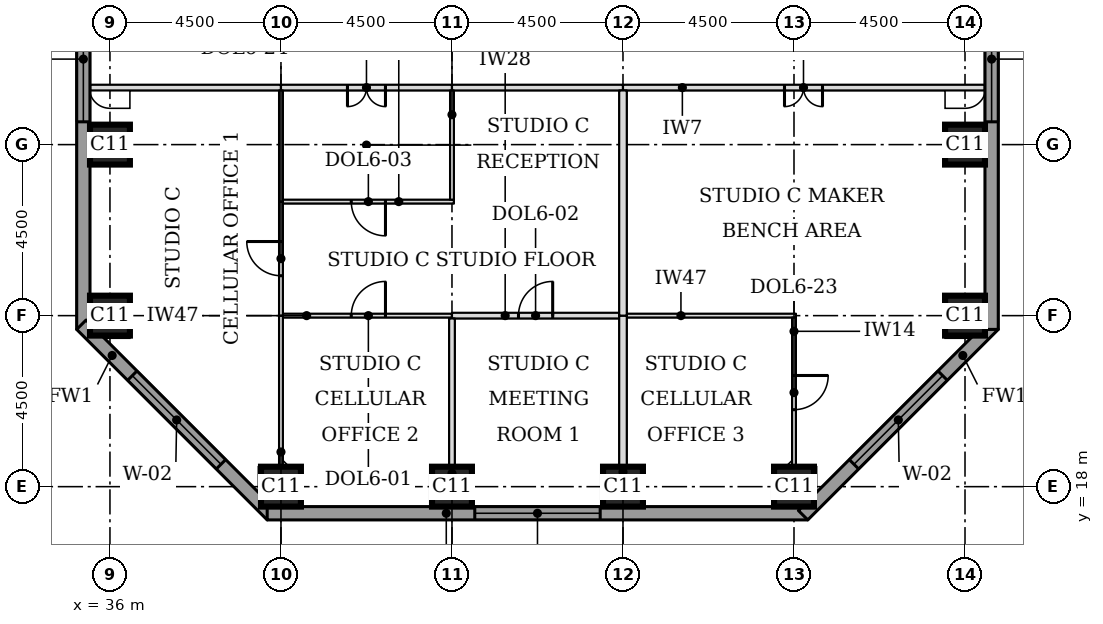
"""IFC4 building model, lengths in metres.
Left out: names, types, materials, properties, quantities, classifications, styles, units other than length and angle.
Written with IfcOpenShell. Run it as: python <this file> out.ifc"""

import sys

from ifc_helpers import new_model, si_unit, direction, frame, frame_2d, origin, origin_2d, place, context, subcontext, project, spatial, rectangle, extrude, element, fill, save


model = new_model("IFC4")
c1 = context("Model", 3, precision=1e-05, world=origin(), true_north=direction((0.0, 1.0)))
c2 = subcontext(c1, "Body", "Model", "MODEL_VIEW")
j1 = project(units=[si_unit("LENGTHUNIT", "METRE"), si_unit("PLANEANGLEUNIT", "RADIAN")], contexts=[c1])
p1 = place(None, origin())
s1 = spatial("IfcSite", under=j1, at=p1, CompositionType="ELEMENT")
p2 = place(p1, origin())
s2 = spatial("IfcBuilding", under=s1, at=p2, CompositionType="ELEMENT")
p3 = place(p2, frame((0.0, 0.0, 119.6)))
s3 = spatial("IfcBuildingStorey", under=s2, at=p3, CompositionType="ELEMENT", Elevation=119.6)
for number, where, z_axis, x_axis in (
    (1, (40.5, 18.0, 0.0), (0.0, 0.0, 1.0), (1.0, 0.0, 0.0)),
    (2, (45.0, 18.0, 0.0), (0.0, 0.0, 1.0), (1.0, 0.0, 0.0)),
    (3, (49.5, 18.0, 0.0), (0.0, 0.0, 1.0), (1.0, 0.0, 0.0)),
    (4, (54.0, 18.0, 0.0), (0.0, 0.0, 1.0), (1.0, 0.0, 0.0)),
    (5, (36.0, 22.5, 0.0), (0.0, 0.0, 1.0), (1.0, 0.0, 0.0)),
    (6, (58.5, 22.5, 0.0), (0.0, 0.0, 1.0), (1.0, 0.0, 0.0)),
    (7, (36.0, 27.0, 0.0), (0.0, 0.0, 1.0), (1.0, 0.0, 0.0)),
    (8, (58.5, 27.0, 0.0), (0.0, 0.0, 1.0), (1.0, 0.0, 0.0)),
):
    element("IfcColumn", number, at=place(p3, frame(where, z_axis=z_axis, x_axis=x_axis)), inside=s3, PredefinedType="COLUMN", context=c2, shape_type="SweptSolid", body=[
        extrude(rectangle(XDim=1.05, YDim=1.05, at=origin_2d()), origin(), (0.0, 0.0, 1.0), 3.7),
    ])
p4 = place(p3, frame((35.3, 39.975, 0.0), z_axis=(0.0, 0.0, 1.0), x_axis=(0.0, -1.0, 0.0)))
e9 = element("IfcWall", 9, at=p4, inside=s3, PredefinedType="STANDARD", context=c2, shape_type="SweptSolid", body=[
    extrude(rectangle(XDim=17.837, YDim=0.35, at=frame_2d((8.919, 0.0))), origin(), (0.0, 0.0, 1.0), 3.525),
])
p5 = place(p4, frame((0.5, 0.0, 0.9)))
e10 = element("IfcOpeningElement", 10, at=p5, cuts=e9, PredefinedType="OPENING", context=c2, shape_type="SweptSolid", body=[
    extrude(rectangle(XDim=3.3, YDim=1.9, at=frame_2d((1.65, 0.95))), frame((0.0, 0.185, 0.0), z_axis=(0.0, -1.0, 0.0), x_axis=(1.0, 0.0, 0.0)), (0.0, 0.0, 1.0), 0.37),
])
p6 = place(p4, frame((9.075, 0.0, 0.9)))
e11 = element("IfcOpeningElement", 11, at=p6, cuts=e9, PredefinedType="OPENING", context=c2, shape_type="SweptSolid", body=[
    extrude(rectangle(XDim=3.3, YDim=1.9, at=frame_2d((1.65, 0.95))), frame((0.0, 0.185, 0.0), z_axis=(0.0, -1.0, 0.0), x_axis=(1.0, 0.0, 0.0)), (0.0, 0.0, 1.0), 0.37),
])
p7 = place(p3, frame((35.249, 22.261, 0.0), z_axis=(0.0, 0.0, 1.0), x_axis=(0.707106781187, -0.707106781187, 0.0)))
e12 = element("IfcWall", 12, at=p7, inside=s3, PredefinedType="STANDARD", context=c2, shape_type="SweptSolid", body=[
    extrude(rectangle(XDim=7.089, YDim=0.35, at=frame_2d((3.544, 0.0))), origin(), (0.0, 0.0, 1.0), 3.525),
])
p8 = place(p7, frame((1.894, 0.0, 0.9)))
e13 = element("IfcOpeningElement", 13, at=p8, cuts=e12, PredefinedType="OPENING", context=c2, shape_type="SweptSolid", body=[
    extrude(rectangle(XDim=3.3, YDim=1.9, at=frame_2d((1.65, 0.95))), frame((0.0, 0.185, 0.0), z_axis=(0.0, -1.0, 0.0), x_axis=(1.0, 0.0, 0.0)), (0.0, 0.0, 1.0), 0.37),
])
p9 = place(p3, frame((40.138, 17.3, 0.0), z_axis=(0.0, 0.0, 1.0), x_axis=(1.0, 0.0, 0.0)))
e14 = element("IfcWall", 14, at=p9, inside=s3, PredefinedType="STANDARD", context=c2, shape_type="SweptSolid", body=[
    extrude(rectangle(XDim=14.225, YDim=0.35, at=frame_2d((7.112, 0.0))), origin(), (0.0, 0.0, 1.0), 3.525),
])
p10 = place(p9, frame((5.462, 0.0, 0.9)))
e15 = element("IfcOpeningElement", 15, at=p10, cuts=e14, PredefinedType="OPENING", context=c2, shape_type="SweptSolid", body=[
    extrude(rectangle(XDim=3.3, YDim=1.9, at=frame_2d((1.65, 0.95))), frame((0.0, 0.185, 0.0), z_axis=(0.0, -1.0, 0.0), x_axis=(1.0, 0.0, 0.0)), (0.0, 0.0, 1.0), 0.37),
])
p11 = place(p3, frame((54.239, 17.249, 0.0), z_axis=(0.0, 0.0, 1.0), x_axis=(0.707106781187, 0.707106781187, 0.0)))
e16 = element("IfcWall", 16, at=p11, inside=s3, PredefinedType="STANDARD", context=c2, shape_type="SweptSolid", body=[
    extrude(rectangle(XDim=7.089, YDim=0.35, at=frame_2d((3.544, 0.0))), origin(), (0.0, 0.0, 1.0), 3.525),
])
p12 = place(p11, frame((1.894, 0.0, 0.9)))
e17 = element("IfcOpeningElement", 17, at=p12, cuts=e16, PredefinedType="OPENING", context=c2, shape_type="SweptSolid", body=[
    extrude(rectangle(XDim=3.3, YDim=1.9, at=frame_2d((1.65, 0.95))), frame((0.0, 0.185, 0.0), z_axis=(0.0, -1.0, 0.0), x_axis=(1.0, 0.0, 0.0)), (0.0, 0.0, 1.0), 0.37),
])
p13 = place(p3, frame((59.2, 22.138, 0.0), z_axis=(0.0, 0.0, 1.0), x_axis=(0.0, 1.0, 0.0)))
e18 = element("IfcWall", 18, at=p13, inside=s3, PredefinedType="STANDARD", context=c2, shape_type="SweptSolid", body=[
    extrude(rectangle(XDim=17.837, YDim=0.35, at=frame_2d((8.919, 0.0))), origin(), (0.0, 0.0, 1.0), 3.525),
])
p14 = place(p13, frame((5.462, 0.0, 0.9)))
e19 = element("IfcOpeningElement", 19, at=p14, cuts=e18, PredefinedType="OPENING", context=c2, shape_type="SweptSolid", body=[
    extrude(rectangle(XDim=3.3, YDim=1.9, at=frame_2d((1.65, 0.95))), frame((0.0, 0.185, 0.0), z_axis=(0.0, -1.0, 0.0), x_axis=(1.0, 0.0, 0.0)), (0.0, 0.0, 1.0), 0.37),
])
p15 = place(p13, frame((14.037, 0.0, 0.9)))
e20 = element("IfcOpeningElement", 20, at=p15, cuts=e18, PredefinedType="OPENING", context=c2, shape_type="SweptSolid", body=[
    extrude(rectangle(XDim=3.3, YDim=1.9, at=frame_2d((1.65, 0.95))), frame((0.0, 0.185, 0.0), z_axis=(0.0, -1.0, 0.0), x_axis=(1.0, 0.0, 0.0)), (0.0, 0.0, 1.0), 0.37),
])
p16 = place(p3, frame((40.55, 22.5, 0.0), z_axis=(0.0, 0.0, 1.0), x_axis=(1.0, 0.0, 0.0)))
e21 = element("IfcWall", 21, at=p16, inside=s3, PredefinedType="PARTITIONING", context=c2, shape_type="SweptSolid", body=[
    extrude(rectangle(XDim=4.45, YDim=0.1, at=frame_2d((2.225, 0.0))), origin(), (0.0, 0.0, 1.0), 2.55),
])
p17 = place(p16, frame((1.8, 0.0, 0.0)))
e22 = element("IfcOpeningElement", 22, at=p17, cuts=e21, PredefinedType="OPENING", context=c2, shape_type="SweptSolid", body=[
    extrude(rectangle(XDim=0.9, YDim=2.1, at=frame_2d((0.45, 1.05))), frame((0.0, 0.06, 0.0), z_axis=(0.0, -1.0, 0.0), x_axis=(1.0, 0.0, 0.0)), (0.0, 0.0, 1.0), 0.12),
])
p18 = place(p3, frame((45.0, 22.5, 0.0), z_axis=(0.0, 0.0, 1.0), x_axis=(1.0, 0.0, 0.0)))
e23 = element("IfcWall", 23, at=p18, inside=s3, PredefinedType="PARTITIONING", context=c2, shape_type="SweptSolid", body=[
    extrude(rectangle(XDim=4.4, YDim=0.15, at=frame_2d((2.2, 0.0))), origin(), (0.0, 0.0, 1.0), 2.55),
])
p19 = place(p18, frame((1.75, 0.0, 0.0)))
e24 = element("IfcOpeningElement", 24, at=p19, cuts=e23, PredefinedType="OPENING", context=c2, shape_type="SweptSolid", body=[
    extrude(rectangle(XDim=0.9, YDim=2.1, at=frame_2d((0.45, 1.05))), frame((0.0, 0.085, 0.0), z_axis=(0.0, -1.0, 0.0), x_axis=(1.0, 0.0, 0.0)), (0.0, 0.0, 1.0), 0.17),
])
p20 = place(p3, frame((49.6, 22.5, 0.0), z_axis=(0.0, 0.0, 1.0), x_axis=(1.0, 0.0, 0.0)))
e25 = element("IfcWall", 25, at=p20, inside=s3, PredefinedType="PARTITIONING", context=c2, shape_type="SweptSolid", body=[
    extrude(rectangle(XDim=4.45, YDim=0.1, at=frame_2d((2.225, 0.0))), origin(), (0.0, 0.0, 1.0), 2.55),
])
p21 = place(p3, frame((40.55, 25.5, 0.0), z_axis=(0.0, 0.0, 1.0), x_axis=(1.0, 0.0, 0.0)))
e26 = element("IfcWall", 26, at=p21, inside=s3, PredefinedType="PARTITIONING", context=c2, shape_type="SweptSolid", body=[
    extrude(rectangle(XDim=4.5, YDim=0.1, at=frame_2d((2.25, 0.0))), origin(), (0.0, 0.0, 1.0), 3.55),
])
p22 = place(p21, frame((1.8, 0.0, 0.0)))
e27 = element("IfcOpeningElement", 27, at=p22, cuts=e26, PredefinedType="OPENING", context=c2, shape_type="SweptSolid", body=[
    extrude(rectangle(XDim=0.9, YDim=2.1, at=frame_2d((0.45, 1.05))), frame((0.0, 0.06, 0.0), z_axis=(0.0, -1.0, 0.0), x_axis=(1.0, 0.0, 0.0)), (0.0, 0.0, 1.0), 0.12),
])
p23 = place(p3, frame((35.475, 28.5, 0.0), z_axis=(0.0, 0.0, 1.0), x_axis=(1.0, 0.0, 0.0)))
e28 = element("IfcWall", 28, at=p23, inside=s3, PredefinedType="PARTITIONING", context=c2, shape_type="SweptSolid", body=[
    extrude(rectangle(XDim=5.025, YDim=0.15, at=frame_2d((2.512, 0.0))), origin(), (0.0, 0.0, 1.0), 3.55),
])
p24 = place(p3, frame((40.5, 28.5, 0.0), z_axis=(0.0, 0.0, 1.0), x_axis=(1.0, 0.0, 0.0)))
e29 = element("IfcWall", 29, at=p24, inside=s3, PredefinedType="PARTITIONING", context=c2, shape_type="SweptSolid", body=[
    extrude(rectangle(XDim=4.5, YDim=0.15, at=frame_2d((2.25, 0.0))), origin(), (0.0, 0.0, 1.0), 3.55),
])
p25 = place(p24, frame((1.75, 0.0, 0.0)))
e30 = element("IfcOpeningElement", 30, at=p25, cuts=e29, PredefinedType="OPENING", context=c2, shape_type="SweptSolid", body=[
    extrude(rectangle(XDim=1.0, YDim=2.1, at=frame_2d((0.5, 1.05))), frame((0.0, 0.085, 0.0), z_axis=(0.0, -1.0, 0.0), x_axis=(1.0, 0.0, 0.0)), (0.0, 0.0, 1.0), 0.17),
])
p26 = place(p3, frame((45.0, 28.5, 0.0), z_axis=(0.0, 0.0, 1.0), x_axis=(1.0, 0.0, 0.0)))
e31 = element("IfcWall", 31, at=p26, inside=s3, PredefinedType="PARTITIONING", context=c2, shape_type="SweptSolid", body=[
    extrude(rectangle(XDim=4.5, YDim=0.15, at=frame_2d((2.25, 0.0))), origin(), (0.0, 0.0, 1.0), 3.55),
])
p27 = place(p3, frame((49.5, 28.5, 0.0), z_axis=(0.0, 0.0, 1.0), x_axis=(1.0, 0.0, 0.0)))
e32 = element("IfcWall", 32, at=p27, inside=s3, PredefinedType="PARTITIONING", context=c2, shape_type="SweptSolid", body=[
    extrude(rectangle(XDim=9.525, YDim=0.15, at=frame_2d((4.762, 0.0))), origin(), (0.0, 0.0, 1.0), 3.55),
])
p28 = place(p27, frame((4.25, 0.0, 0.0)))
e33 = element("IfcOpeningElement", 33, at=p28, cuts=e32, PredefinedType="OPENING", context=c2, shape_type="SweptSolid", body=[
    extrude(rectangle(XDim=1.0, YDim=2.1, at=frame_2d((0.5, 1.05))), frame((0.0, 0.085, 0.0), z_axis=(0.0, -1.0, 0.0), x_axis=(1.0, 0.0, 0.0)), (0.0, 0.0, 1.0), 0.17),
])
p29 = place(p3, frame((45.0, 17.475, 0.0), z_axis=(0.0, 0.0, 1.0), x_axis=(0.0, 1.0, 0.0)))
e34 = element("IfcWall", 34, at=p29, inside=s3, PredefinedType="PARTITIONING", context=c2, shape_type="SweptSolid", body=[
    extrude(rectangle(XDim=4.95, YDim=0.15, at=frame_2d((2.475, 0.0))), origin(), (0.0, 0.0, 1.0), 3.55),
])
p30 = place(p3, frame((49.5, 17.475, 0.0), z_axis=(0.0, 0.0, 1.0), x_axis=(0.0, 1.0, 0.0)))
e35 = element("IfcWall", 35, at=p30, inside=s3, PredefinedType="PARTITIONING", context=c2, shape_type="SweptSolid", body=[
    extrude(rectangle(XDim=5.025, YDim=0.2, at=frame_2d((2.512, 0.0))), origin(), (0.0, 0.0, 1.0), 3.55),
])
p31 = place(p3, frame((40.5, 18.525, 0.0), z_axis=(0.0, 0.0, 1.0), x_axis=(0.0, 1.0, 0.0)))
e36 = element("IfcWall", 36, at=p31, inside=s3, PredefinedType="PARTITIONING", context=c2, shape_type="SweptSolid", body=[
    extrude(rectangle(XDim=3.975, YDim=0.1, at=frame_2d((1.988, 0.0))), origin(), (0.0, 0.0, 1.0), 3.55),
])
p32 = place(p3, frame((54.0, 18.525, 0.0), z_axis=(0.0, 0.0, 1.0), x_axis=(0.0, 1.0, 0.0)))
e37 = element("IfcWall", 37, at=p32, inside=s3, PredefinedType="PARTITIONING", context=c2, shape_type="SweptSolid", body=[
    extrude(rectangle(XDim=3.925, YDim=0.1, at=frame_2d((1.962, 0.0))), origin(), (0.0, 0.0, 1.0), 3.55),
])
p33 = place(p32, frame((1.5, 0.0, 0.0)))
e38 = element("IfcOpeningElement", 38, at=p33, cuts=e37, PredefinedType="OPENING", context=c2, shape_type="SweptSolid", body=[
    extrude(rectangle(XDim=0.9, YDim=2.1, at=frame_2d((0.45, 1.05))), frame((0.0, 0.06, 0.0), z_axis=(0.0, -1.0, 0.0), x_axis=(1.0, 0.0, 0.0)), (0.0, 0.0, 1.0), 0.12),
])
p34 = place(p3, frame((40.5, 22.5, 0.0), z_axis=(0.0, 0.0, 1.0), x_axis=(0.0, 1.0, 0.0)))
e39 = element("IfcWall", 39, at=p34, inside=s3, PredefinedType="PARTITIONING", context=c2, shape_type="SweptSolid", body=[
    extrude(rectangle(XDim=3.0, YDim=0.1, at=frame_2d((1.5, 0.0))), origin(), (0.0, 0.0, 1.0), 3.55),
])
p35 = place(p34, frame((1.05, 0.0, 0.0)))
e40 = element("IfcOpeningElement", 40, at=p35, cuts=e39, PredefinedType="OPENING", context=c2, shape_type="SweptSolid", body=[
    extrude(rectangle(XDim=0.9, YDim=2.1, at=frame_2d((0.45, 1.05))), frame((0.0, 0.06, 0.0), z_axis=(0.0, -1.0, 0.0), x_axis=(1.0, 0.0, 0.0)), (0.0, 0.0, 1.0), 0.12),
])
p36 = place(p3, frame((49.5, 22.5, 0.0), z_axis=(0.0, 0.0, 1.0), x_axis=(0.0, 1.0, 0.0)))
e41 = element("IfcWall", 41, at=p36, inside=s3, PredefinedType="PARTITIONING", context=c2, shape_type="SweptSolid", body=[
    extrude(rectangle(XDim=5.925, YDim=0.2, at=frame_2d((2.962, 0.0))), origin(), (0.0, 0.0, 1.0), 3.55),
])
p37 = place(p3, frame((40.5, 25.5, 0.0), z_axis=(0.0, 0.0, 1.0), x_axis=(0.0, 1.0, 0.0)))
e42 = element("IfcWall", 42, at=p37, inside=s3, PredefinedType="PARTITIONING", context=c2, shape_type="SweptSolid", body=[
    extrude(rectangle(XDim=2.925, YDim=0.1, at=frame_2d((1.462, 0.0))), origin(), (0.0, 0.0, 1.0), 3.55),
])
p38 = place(p3, frame((45.0, 25.55, 0.0), z_axis=(0.0, 0.0, 1.0), x_axis=(0.0, 1.0, 0.0)))
e43 = element("IfcWall", 43, at=p38, inside=s3, PredefinedType="PARTITIONING", context=c2, shape_type="SweptSolid", body=[
    extrude(rectangle(XDim=2.875, YDim=0.1, at=frame_2d((1.438, 0.0))), origin(), (0.0, 0.0, 1.0), 3.55),
])
p39 = place(p6, origin())
e44 = element("IfcWindow", 44, at=p39, inside=s3, PartitioningType="SINGLE_PANEL", PredefinedType="WINDOW", context=c2, shape_type="SweptSolid", body=[
    extrude(rectangle(XDim=3.3, YDim=1.9, at=frame_2d((1.65, 0.95))), frame((0.0, 0.085, 0.0), z_axis=(0.0, -1.0, 0.0), x_axis=(1.0, 0.0, 0.0)), (0.0, 0.0, 1.0), 0.06),
])
fill(e11, e44)
p40 = place(p8, origin())
e45 = element("IfcWindow", 45, at=p40, inside=s3, PartitioningType="SINGLE_PANEL", PredefinedType="WINDOW", context=c2, shape_type="SweptSolid", body=[
    extrude(rectangle(XDim=3.3, YDim=1.9, at=frame_2d((1.65, 0.95))), frame((0.0, 0.085, 0.0), z_axis=(0.0, -1.0, 0.0), x_axis=(1.0, 0.0, 0.0)), (0.0, 0.0, 1.0), 0.06),
])
fill(e13, e45)
p41 = place(p10, origin())
e46 = element("IfcWindow", 46, at=p41, inside=s3, PartitioningType="SINGLE_PANEL", PredefinedType="WINDOW", context=c2, shape_type="SweptSolid", body=[
    extrude(rectangle(XDim=3.3, YDim=1.9, at=frame_2d((1.65, 0.95))), frame((0.0, 0.085, 0.0), z_axis=(0.0, -1.0, 0.0), x_axis=(1.0, 0.0, 0.0)), (0.0, 0.0, 1.0), 0.06),
])
fill(e15, e46)
p42 = place(p12, origin())
e47 = element("IfcWindow", 47, at=p42, inside=s3, PartitioningType="SINGLE_PANEL", PredefinedType="WINDOW", context=c2, shape_type="SweptSolid", body=[
    extrude(rectangle(XDim=3.3, YDim=1.9, at=frame_2d((1.65, 0.95))), frame((0.0, 0.085, 0.0), z_axis=(0.0, -1.0, 0.0), x_axis=(1.0, 0.0, 0.0)), (0.0, 0.0, 1.0), 0.06),
])
fill(e17, e47)
p43 = place(p14, origin())
e48 = element("IfcWindow", 48, at=p43, inside=s3, PartitioningType="SINGLE_PANEL", PredefinedType="WINDOW", context=c2, shape_type="SweptSolid", body=[
    extrude(rectangle(XDim=3.3, YDim=1.9, at=frame_2d((1.65, 0.95))), frame((0.0, 0.085, 0.0), z_axis=(0.0, -1.0, 0.0), x_axis=(1.0, 0.0, 0.0)), (0.0, 0.0, 1.0), 0.06),
])
fill(e19, e48)
p44 = place(p25, frame((1.0, 0.0, 0.0), z_axis=(0.0, 0.0, 1.0), x_axis=(-1.0, 0.0, 0.0)))
e49 = element("IfcDoor", 49, at=p44, inside=s3, OperationType="DOUBLE_DOOR_SINGLE_SWING", PredefinedType="DOOR", context=c2, shape_type="SweptSolid", body=[
    extrude(rectangle(XDim=1.0, YDim=2.1, at=frame_2d((0.5, 1.05))), frame((0.0, 0.025, 0.0), z_axis=(0.0, -1.0, 0.0), x_axis=(1.0, 0.0, 0.0)), (0.0, 0.0, 1.0), 0.05),
])
fill(e30, e49)
p45 = place(p22, frame((0.9, 0.0, 0.0), z_axis=(0.0, 0.0, 1.0), x_axis=(-1.0, 0.0, 0.0)))
e50 = element("IfcDoor", 50, at=p45, inside=s3, OperationType="SINGLE_SWING_LEFT", PredefinedType="DOOR", context=c2, shape_type="SweptSolid", body=[
    extrude(rectangle(XDim=0.9, YDim=2.1, at=frame_2d((0.45, 1.05))), frame((0.0, 0.025, 0.0), z_axis=(0.0, -1.0, 0.0), x_axis=(1.0, 0.0, 0.0)), (0.0, 0.0, 1.0), 0.05),
])
fill(e27, e50)
p46 = place(p35, origin())
e51 = element("IfcDoor", 51, at=p46, inside=s3, OperationType="SINGLE_SWING_RIGHT", PredefinedType="DOOR", context=c2, shape_type="SweptSolid", body=[
    extrude(rectangle(XDim=0.9, YDim=2.1, at=frame_2d((0.45, 1.05))), frame((0.0, 0.025, 0.0), z_axis=(0.0, -1.0, 0.0), x_axis=(1.0, 0.0, 0.0)), (0.0, 0.0, 1.0), 0.05),
])
fill(e40, e51)
p47 = place(p17, origin())
e52 = element("IfcDoor", 52, at=p47, inside=s3, OperationType="SINGLE_SWING_RIGHT", PredefinedType="DOOR", context=c2, shape_type="SweptSolid", body=[
    extrude(rectangle(XDim=0.9, YDim=2.1, at=frame_2d((0.45, 1.05))), frame((0.0, 0.025, 0.0), z_axis=(0.0, -1.0, 0.0), x_axis=(1.0, 0.0, 0.0)), (0.0, 0.0, 1.0), 0.05),
])
fill(e22, e52)
p48 = place(p19, origin())
e53 = element("IfcDoor", 53, at=p48, inside=s3, OperationType="SINGLE_SWING_RIGHT", PredefinedType="DOOR", context=c2, shape_type="SweptSolid", body=[
    extrude(rectangle(XDim=0.9, YDim=2.1, at=frame_2d((0.45, 1.05))), frame((0.0, 0.025, 0.0), z_axis=(0.0, -1.0, 0.0), x_axis=(1.0, 0.0, 0.0)), (0.0, 0.0, 1.0), 0.05),
])
fill(e24, e53)
p49 = place(p28, frame((1.0, 0.0, 0.0), z_axis=(0.0, 0.0, 1.0), x_axis=(-1.0, 0.0, 0.0)))
e54 = element("IfcDoor", 54, at=p49, inside=s3, OperationType="DOUBLE_DOOR_SINGLE_SWING", PredefinedType="DOOR", context=c2, shape_type="SweptSolid", body=[
    extrude(rectangle(XDim=1.0, YDim=2.1, at=frame_2d((0.5, 1.05))), frame((0.0, 0.025, 0.0), z_axis=(0.0, -1.0, 0.0), x_axis=(1.0, 0.0, 0.0)), (0.0, 0.0, 1.0), 0.05),
])
fill(e33, e54)
p50 = place(p33, frame((0.9, 0.0, 0.0), z_axis=(0.0, 0.0, 1.0), x_axis=(-1.0, 0.0, 0.0)))
e55 = element("IfcDoor", 55, at=p50, inside=s3, OperationType="SINGLE_SWING_LEFT", PredefinedType="DOOR", context=c2, shape_type="SweptSolid", body=[
    extrude(rectangle(XDim=0.9, YDim=2.1, at=frame_2d((0.45, 1.05))), frame((0.0, 0.025, 0.0), z_axis=(0.0, -1.0, 0.0), x_axis=(1.0, 0.0, 0.0)), (0.0, 0.0, 1.0), 0.05),
])
fill(e38, e55)
save(model, sys.argv[1])
